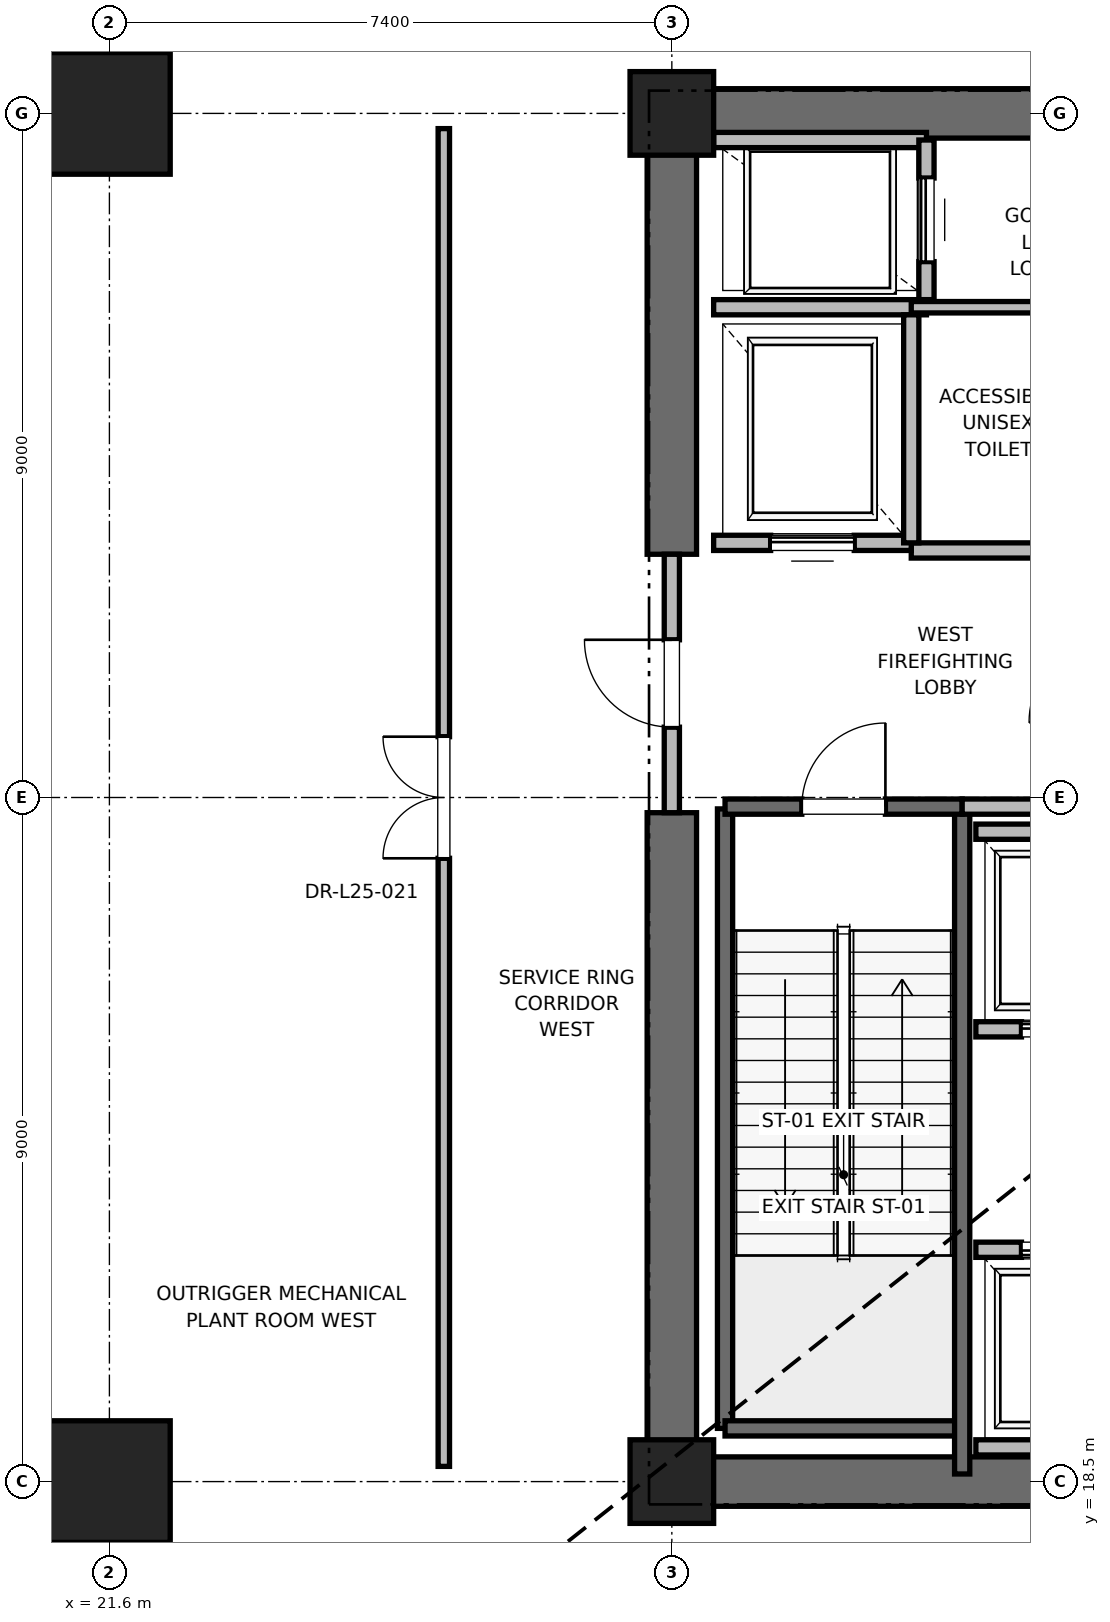
"""IFC4 building model, lengths in metres.
Left out: names, types, materials, properties, quantities, classifications, styles, units other than length and angle.
Written with IfcOpenShell. Run it as: python <this file> out.ifc"""

import sys

from ifc_helpers import new_model, si_unit, direction, frame, frame_2d, origin, origin_2d, place, context, subcontext, project, spatial, rectangle, extrude, element, fill, save


model = new_model("IFC4")
c1 = context("Model", 3, precision=1e-05, world=origin(), true_north=direction((0.0, 1.0)))
c2 = subcontext(c1, "Body", "Model", "MODEL_VIEW")
j1 = project(units=[si_unit("LENGTHUNIT", "METRE"), si_unit("PLANEANGLEUNIT", "RADIAN")], contexts=[c1])
p1 = place(None, origin())
s1 = spatial("IfcSite", under=j1, at=p1, CompositionType="ELEMENT")
p2 = place(p1, origin())
s2 = spatial("IfcBuilding", under=s1, at=p2, CompositionType="ELEMENT")
p3 = place(p2, frame((0.0, 0.0, 107.6)))
s3 = spatial("IfcBuildingStorey", under=s2, at=p3, CompositionType="ELEMENT", Elevation=107.6)
for number, where, z_axis, x_axis in (
    (1, (21.6, 18.5, 0.0), (0.0, 0.0, 1.0), (1.0, 0.0, 0.0)),
    (2, (21.6, 36.5, 0.0), (0.0, 0.0, 1.0), (1.0, 0.0, 0.0)),
):
    element("IfcColumn", number, at=place(p3, frame(where, z_axis=z_axis, x_axis=x_axis)), inside=s3, PredefinedType="COLUMN", context=c2, shape_type="SweptSolid", body=[
        extrude(rectangle(XDim=1.6, YDim=1.6, at=origin_2d()), origin(), (0.0, 0.0, 1.0), 5.4),
    ])
for number, where, z_axis, x_axis in (
    (3, (29.0, 18.5, 0.0), (0.0, 0.0, 1.0), (1.0, 0.0, 0.0)),
    (4, (29.0, 36.5, 0.0), (0.0, 0.0, 1.0), (1.0, 0.0, 0.0)),
):
    element("IfcColumn", number, at=place(p3, frame(where, z_axis=z_axis, x_axis=x_axis)), inside=s3, PredefinedType="PILASTER", context=c2, shape_type="SweptSolid", body=[
        extrude(rectangle(XDim=1.1, YDim=1.1, at=origin_2d()), origin(), (0.0, 0.0, 1.0), 5.4),
    ])
p4 = place(p3, frame((29.0, 18.5, 0.0), z_axis=(0.0, 0.0, 1.0), x_axis=(1.0, 0.0, 0.0)))
e5 = element("IfcWall", 5, at=p4, inside=s3, PredefinedType="SHEAR", context=c2, shape_type="SweptSolid", body=[
    extrude(rectangle(XDim=9.2, YDim=0.65, at=frame_2d((4.6, 0.0))), origin(), (0.0, 0.0, 1.0), 5.1),
])
p5 = place(p3, frame((29.0, 36.5, 0.0), z_axis=(0.0, 0.0, 1.0), x_axis=(1.0, 0.0, 0.0)))
e6 = element("IfcWall", 6, at=p5, inside=s3, PredefinedType="SHEAR", context=c2, shape_type="SweptSolid", body=[
    extrude(rectangle(XDim=5.8, YDim=0.65, at=frame_2d((2.9, 0.0))), origin(), (0.0, 0.0, 1.0), 5.1),
])
p6 = place(p3, frame((29.0, 18.5, 0.0), z_axis=(0.0, 0.0, 1.0), x_axis=(0.0, 1.0, 0.0)))
e7 = element("IfcWall", 7, at=p6, inside=s3, PredefinedType="SHEAR", context=c2, shape_type="SweptSolid", body=[
    extrude(rectangle(XDim=8.8, YDim=0.65, at=frame_2d((4.4, 0.0))), origin(), (0.0, 0.0, 1.0), 5.1),
])
p7 = place(p3, frame((29.0, 30.7, 0.0), z_axis=(0.0, 0.0, 1.0), x_axis=(0.0, 1.0, 0.0)))
e8 = element("IfcWall", 8, at=p7, inside=s3, PredefinedType="SHEAR", context=c2, shape_type="SweptSolid", body=[
    extrude(rectangle(XDim=5.8, YDim=0.65, at=frame_2d((2.9, 0.0))), origin(), (0.0, 0.0, 1.0), 5.1),
])
p8 = place(p3, frame((29.7, 19.2, 0.0), z_axis=(0.0, 0.0, 1.0), x_axis=(0.0, 1.0, 0.0)))
e9 = element("IfcWall", 9, at=p8, inside=s3, PredefinedType="SOLIDWALL", context=c2, shape_type="SweptSolid", body=[
    extrude(rectangle(XDim=8.15, YDim=0.2, at=frame_2d((4.075, 0.0))), origin(), (0.0, 0.0, 1.0), 5.1),
])
p9 = place(p3, frame((29.7, 19.2, 0.0), z_axis=(0.0, 0.0, 1.0), x_axis=(1.0, 0.0, 0.0)))
e10 = element("IfcWall", 10, at=p9, inside=s3, PredefinedType="SOLIDWALL", context=c2, shape_type="SweptSolid", body=[
    extrude(rectangle(XDim=3.12, YDim=0.2, at=frame_2d((1.56, 0.0))), origin(), (0.0, 0.0, 1.0), 5.1),
])
p10 = place(p3, frame((32.82, 18.6, 0.0), z_axis=(0.0, 0.0, 1.0), x_axis=(0.0, 1.0, 0.0)))
e11 = element("IfcWall", 11, at=p10, inside=s3, PredefinedType="SOLIDWALL", context=c2, shape_type="SweptSolid", body=[
    extrude(rectangle(XDim=8.78, YDim=0.2, at=frame_2d((4.39, 0.0))), origin(), (0.0, 0.0, 1.0), 5.1),
])
p11 = place(p3, frame((29.7, 27.38, 0.0), z_axis=(0.0, 0.0, 1.0), x_axis=(1.0, 0.0, 0.0)))
e12 = element("IfcWall", 12, at=p11, inside=s3, PredefinedType="SOLIDWALL", context=c2, shape_type="SweptSolid", body=[
    extrude(rectangle(XDim=3.12, YDim=0.2, at=frame_2d((1.56, 0.0))), origin(), (0.0, 0.0, 1.0), 5.1),
])
p12 = place(p11, frame((1.01, 0.0, 0.0)))
e13 = element("IfcOpeningElement", 13, at=p12, cuts=e12, PredefinedType="OPENING", context=c2, shape_type="SweptSolid", body=[
    extrude(rectangle(XDim=1.1, YDim=2.15, at=frame_2d((0.55, 1.075))), frame((0.0, 0.1, 0.0), z_axis=(0.0, -1.0, 0.0), x_axis=(1.0, 0.0, 0.0)), (0.0, 0.0, 1.0), 0.2),
])
p13 = place(p3, frame((29.0, 27.3, 0.0), z_axis=(0.0, 0.0, 1.0), x_axis=(0.0, 1.0, 0.0)))
e14 = element("IfcWall", 14, at=p13, inside=s3, PredefinedType="PARTITIONING", context=c2, shape_type="SweptSolid", body=[
    extrude(rectangle(XDim=3.4, YDim=0.2, at=frame_2d((1.7, 0.0))), origin(), (0.0, 0.0, 1.0), 3.88),
])
p14 = place(p13, frame((1.125, 0.0, 0.0)))
e15 = element("IfcOpeningElement", 15, at=p14, cuts=e14, PredefinedType="OPENING", context=c2, shape_type="SweptSolid", body=[
    extrude(rectangle(XDim=1.15, YDim=2.2, at=frame_2d((0.575, 1.1))), frame((0.0, 0.1, 0.0), z_axis=(0.0, -1.0, 0.0), x_axis=(1.0, 0.0, 0.0)), (0.0, 0.0, 1.0), 0.2),
])
p15 = place(p3, frame((32.82, 27.38, 0.0), z_axis=(0.0, 0.0, 1.0), x_axis=(1.0, 0.0, 0.0)))
e16 = element("IfcWall", 16, at=p15, inside=s3, PredefinedType="PARTITIONING", context=c2, shape_type="SweptSolid", body=[
    extrude(rectangle(XDim=5.62, YDim=0.2, at=frame_2d((2.81, 0.0))), origin(), (0.0, 0.0, 1.0), 5.1),
])
p16 = place(p3, frame((32.15, 30.75, 0.0), z_axis=(0.0, 0.0, 1.0), x_axis=(1.0, 0.0, 0.0)))
e17 = element("IfcWall", 17, at=p16, inside=s3, PredefinedType="PARTITIONING", context=c2, shape_type="SweptSolid", body=[
    extrude(rectangle(XDim=3.13, YDim=0.2, at=frame_2d((1.565, 0.0))), origin(), (0.0, 0.0, 1.0), 5.1),
])
p17 = place(p3, frame((29.55, 30.85, 0.0), z_axis=(0.0, 0.0, 1.0), x_axis=(1.0, 0.0, 0.0)))
e18 = element("IfcWall", 18, at=p17, inside=s3, PredefinedType="SOLIDWALL", context=c2, shape_type="SweptSolid", body=[
    extrude(rectangle(XDim=2.6, YDim=0.2, at=frame_2d((1.3, 0.0))), origin(), (0.0, 0.0, 1.0), 3.88),
])
p18 = place(p17, frame((0.75, 0.0, 0.0)))
e19 = element("IfcOpeningElement", 19, at=p18, cuts=e18, PredefinedType="OPENING", context=c2, shape_type="SweptSolid", body=[
    extrude(rectangle(XDim=1.1, YDim=2.2, at=frame_2d((0.55, 1.1))), frame((0.0, 0.1, 0.0), z_axis=(0.0, -1.0, 0.0), x_axis=(1.0, 0.0, 0.0)), (0.0, 0.0, 1.0), 0.2),
])
p19 = place(p3, frame((29.55, 33.95, 0.0), z_axis=(0.0, 0.0, 1.0), x_axis=(1.0, 0.0, 0.0)))
e20 = element("IfcWall", 20, at=p19, inside=s3, PredefinedType="SOLIDWALL", context=c2, shape_type="SweptSolid", body=[
    extrude(rectangle(XDim=2.8, YDim=0.2, at=frame_2d((1.4, 0.0))), origin(), (0.0, 0.0, 1.0), 5.1),
])
p20 = place(p3, frame((32.15, 30.85, 0.0), z_axis=(0.0, 0.0, 1.0), x_axis=(0.0, 1.0, 0.0)))
e21 = element("IfcWall", 21, at=p20, inside=s3, PredefinedType="SOLIDWALL", context=c2, shape_type="SweptSolid", body=[
    extrude(rectangle(XDim=3.0, YDim=0.2, at=frame_2d((1.5, 0.0))), origin(), (0.0, 0.0, 1.0), 5.1),
])
p21 = place(p3, frame((32.35, 36.15, 0.0), z_axis=(0.0, 0.0, 1.0), x_axis=(-1.0, 0.0, 0.0)))
e22 = element("IfcWall", 22, at=p21, inside=s3, PredefinedType="SOLIDWALL", context=c2, shape_type="SweptSolid", body=[
    extrude(rectangle(XDim=2.8, YDim=0.2, at=frame_2d((1.4, 0.0))), origin(), (0.0, 0.0, 1.0), 4.153),
])
p22 = place(p3, frame((32.35, 34.05, 0.0), z_axis=(0.0, 0.0, 1.0), x_axis=(0.0, 1.0, 0.0)))
e23 = element("IfcWall", 23, at=p22, inside=s3, PredefinedType="SOLIDWALL", context=c2, shape_type="SweptSolid", body=[
    extrude(rectangle(XDim=2.1, YDim=0.2, at=frame_2d((1.05, 0.0))), origin(), (0.0, 0.0, 1.0), 5.1),
])
p23 = place(p22, frame((0.5, 0.0, 0.0)))
e24 = element("IfcOpeningElement", 24, at=p23, cuts=e23, PredefinedType="OPENING", context=c2, shape_type="SweptSolid", body=[
    extrude(rectangle(XDim=1.1, YDim=2.2, at=frame_2d((0.55, 1.1))), frame((0.0, 0.1, 0.0), z_axis=(0.0, -1.0, 0.0), x_axis=(1.0, 0.0, 0.0)), (0.0, 0.0, 1.0), 0.2),
])
p24 = place(p3, frame((33.0, 18.95, 0.0), z_axis=(0.0, 0.0, 1.0), x_axis=(1.0, 0.0, 0.0)))
e25 = element("IfcWall", 25, at=p24, inside=s3, PredefinedType="SOLIDWALL", context=c2, shape_type="SweptSolid", body=[
    extrude(rectangle(XDim=2.3, YDim=0.2, at=frame_2d((1.15, 0.0))), origin(), (0.0, 0.0, 1.0), 5.1),
])
p25 = place(p3, frame((35.3, 21.55, 0.0), z_axis=(0.0, 0.0, 1.0), x_axis=(-1.0, 0.0, 0.0)))
e26 = element("IfcWall", 26, at=p25, inside=s3, PredefinedType="SOLIDWALL", context=c2, shape_type="SweptSolid", body=[
    extrude(rectangle(XDim=2.3, YDim=0.2, at=frame_2d((1.15, 0.0))), origin(), (0.0, 0.0, 1.0), 5.1),
])
p26 = place(p25, frame((0.6, 0.0, 0.0)))
e27 = element("IfcOpeningElement", 27, at=p26, cuts=e26, PredefinedType="OPENING", context=c2, shape_type="SweptSolid", body=[
    extrude(rectangle(XDim=1.1, YDim=2.2, at=frame_2d((0.55, 1.1))), frame((0.0, 0.1, 0.0), z_axis=(0.0, -1.0, 0.0), x_axis=(1.0, 0.0, 0.0)), (0.0, 0.0, 1.0), 0.2),
])
p27 = place(p3, frame((33.0, 24.45, 0.0), z_axis=(0.0, 0.0, 1.0), x_axis=(1.0, 0.0, 0.0)))
e28 = element("IfcWall", 28, at=p27, inside=s3, PredefinedType="SOLIDWALL", context=c2, shape_type="SweptSolid", body=[
    extrude(rectangle(XDim=2.3, YDim=0.2, at=frame_2d((1.15, 0.0))), origin(), (0.0, 0.0, 1.0), 5.1),
])
p28 = place(p27, frame((0.6, 0.0, 0.0)))
e29 = element("IfcOpeningElement", 29, at=p28, cuts=e28, PredefinedType="OPENING", context=c2, shape_type="SweptSolid", body=[
    extrude(rectangle(XDim=1.1, YDim=2.2, at=frame_2d((0.55, 1.1))), frame((0.0, 0.1, 0.0), z_axis=(0.0, -1.0, 0.0), x_axis=(1.0, 0.0, 0.0)), (0.0, 0.0, 1.0), 0.2),
])
p29 = place(p3, frame((35.3, 27.05, 0.0), z_axis=(0.0, 0.0, 1.0), x_axis=(-1.0, 0.0, 0.0)))
e30 = element("IfcWall", 30, at=p29, inside=s3, PredefinedType="SOLIDWALL", context=c2, shape_type="SweptSolid", body=[
    extrude(rectangle(XDim=2.3, YDim=0.2, at=frame_2d((1.15, 0.0))), origin(), (0.0, 0.0, 1.0), 5.1),
])
p30 = place(p3, frame((32.15, 33.95, 0.0), z_axis=(0.0, 0.0, 1.0), x_axis=(1.0, 0.0, 0.0)))
e31 = element("IfcWall", 31, at=p30, inside=s3, PredefinedType="PARTITIONING", context=c2, shape_type="SweptSolid", body=[
    extrude(rectangle(XDim=3.13, YDim=0.15, at=frame_2d((1.565, 0.0))), origin(), (0.0, 0.0, 1.0), 2.85),
])
p31 = place(p3, frame((26.0, 18.7, 0.0), z_axis=(0.0, 0.0, 1.0), x_axis=(0.0, 1.0, 0.0)))
e32 = element("IfcWall", 32, at=p31, inside=s3, PredefinedType="PARTITIONING", context=c2, shape_type="SweptSolid", body=[
    extrude(rectangle(XDim=17.6, YDim=0.15, at=frame_2d((8.8, 0.0))), origin(), (0.0, 0.0, 1.0), 2.85),
])
p32 = place(p31, frame((8.0, 0.0, 0.0)))
e33 = element("IfcOpeningElement", 33, at=p32, cuts=e32, PredefinedType="OPENING", context=c2, shape_type="SweptSolid", body=[
    extrude(rectangle(XDim=1.6, YDim=2.25, at=frame_2d((0.8, 1.125))), frame((0.0, 0.075, 0.0), z_axis=(0.0, -1.0, 0.0), x_axis=(1.0, 0.0, 0.0)), (0.0, 0.0, 1.0), 0.15),
])
p33 = place(p12, origin())
e34 = element("IfcDoor", 34, at=p33, inside=s3, OperationType="SINGLE_SWING_RIGHT", PredefinedType="DOOR", context=c2, shape_type="SweptSolid", body=[
    extrude(rectangle(XDim=1.1, YDim=2.15, at=frame_2d((0.55, 1.075))), frame((0.0, 0.025, 0.0), z_axis=(0.0, -1.0, 0.0), x_axis=(1.0, 0.0, 0.0)), (0.0, 0.0, 1.0), 0.05),
])
fill(e13, e34)
p34 = place(p14, origin())
e35 = element("IfcDoor", 35, at=p34, inside=s3, OperationType="SINGLE_SWING_RIGHT", PredefinedType="DOOR", context=c2, shape_type="SweptSolid", body=[
    extrude(rectangle(XDim=1.15, YDim=2.2, at=frame_2d((0.575, 1.1))), frame((0.0, 0.025, 0.0), z_axis=(0.0, -1.0, 0.0), x_axis=(1.0, 0.0, 0.0)), (0.0, 0.0, 1.0), 0.05),
])
fill(e15, e35)
p35 = place(p18, origin())
e36 = element("IfcDoor", 36, at=p35, inside=s3, OperationType="SLIDING_TO_RIGHT", PredefinedType="DOOR", context=c2, shape_type="SweptSolid", body=[
    extrude(rectangle(XDim=1.1, YDim=2.2, at=frame_2d((0.55, 1.1))), frame((0.0, 0.025, 0.0), z_axis=(0.0, -1.0, 0.0), x_axis=(1.0, 0.0, 0.0)), (0.0, 0.0, 1.0), 0.05),
])
fill(e19, e36)
p36 = place(p23, origin())
e37 = element("IfcDoor", 37, at=p36, inside=s3, OperationType="SLIDING_TO_RIGHT", PredefinedType="DOOR", context=c2, shape_type="SweptSolid", body=[
    extrude(rectangle(XDim=1.1, YDim=2.2, at=frame_2d((0.55, 1.1))), frame((0.0, 0.025, 0.0), z_axis=(0.0, -1.0, 0.0), x_axis=(1.0, 0.0, 0.0)), (0.0, 0.0, 1.0), 0.05),
])
fill(e24, e37)
p37 = place(p26, origin())
e38 = element("IfcDoor", 38, at=p37, inside=s3, OperationType="SLIDING_TO_RIGHT", PredefinedType="DOOR", context=c2, shape_type="SweptSolid", body=[
    extrude(rectangle(XDim=1.1, YDim=2.2, at=frame_2d((0.55, 1.1))), frame((0.0, 0.025, 0.0), z_axis=(0.0, -1.0, 0.0), x_axis=(1.0, 0.0, 0.0)), (0.0, 0.0, 1.0), 0.05),
])
fill(e27, e38)
p38 = place(p28, origin())
e39 = element("IfcDoor", 39, at=p38, inside=s3, OperationType="SLIDING_TO_RIGHT", PredefinedType="DOOR", context=c2, shape_type="SweptSolid", body=[
    extrude(rectangle(XDim=1.1, YDim=2.2, at=frame_2d((0.55, 1.1))), frame((0.0, 0.025, 0.0), z_axis=(0.0, -1.0, 0.0), x_axis=(1.0, 0.0, 0.0)), (0.0, 0.0, 1.0), 0.05),
])
fill(e29, e39)
p39 = place(p32, origin())
e40 = element("IfcDoor", 40, at=p39, inside=s3, OperationType="DOUBLE_DOOR_SINGLE_SWING", PredefinedType="DOOR", context=c2, shape_type="SweptSolid", body=[
    extrude(rectangle(XDim=1.6, YDim=2.25, at=frame_2d((0.8, 1.125))), frame((0.0, 0.025, 0.0), z_axis=(0.0, -1.0, 0.0), x_axis=(1.0, 0.0, 0.0)), (0.0, 0.0, 1.0), 0.05),
])
fill(e33, e40)
save(model, sys.argv[1])
